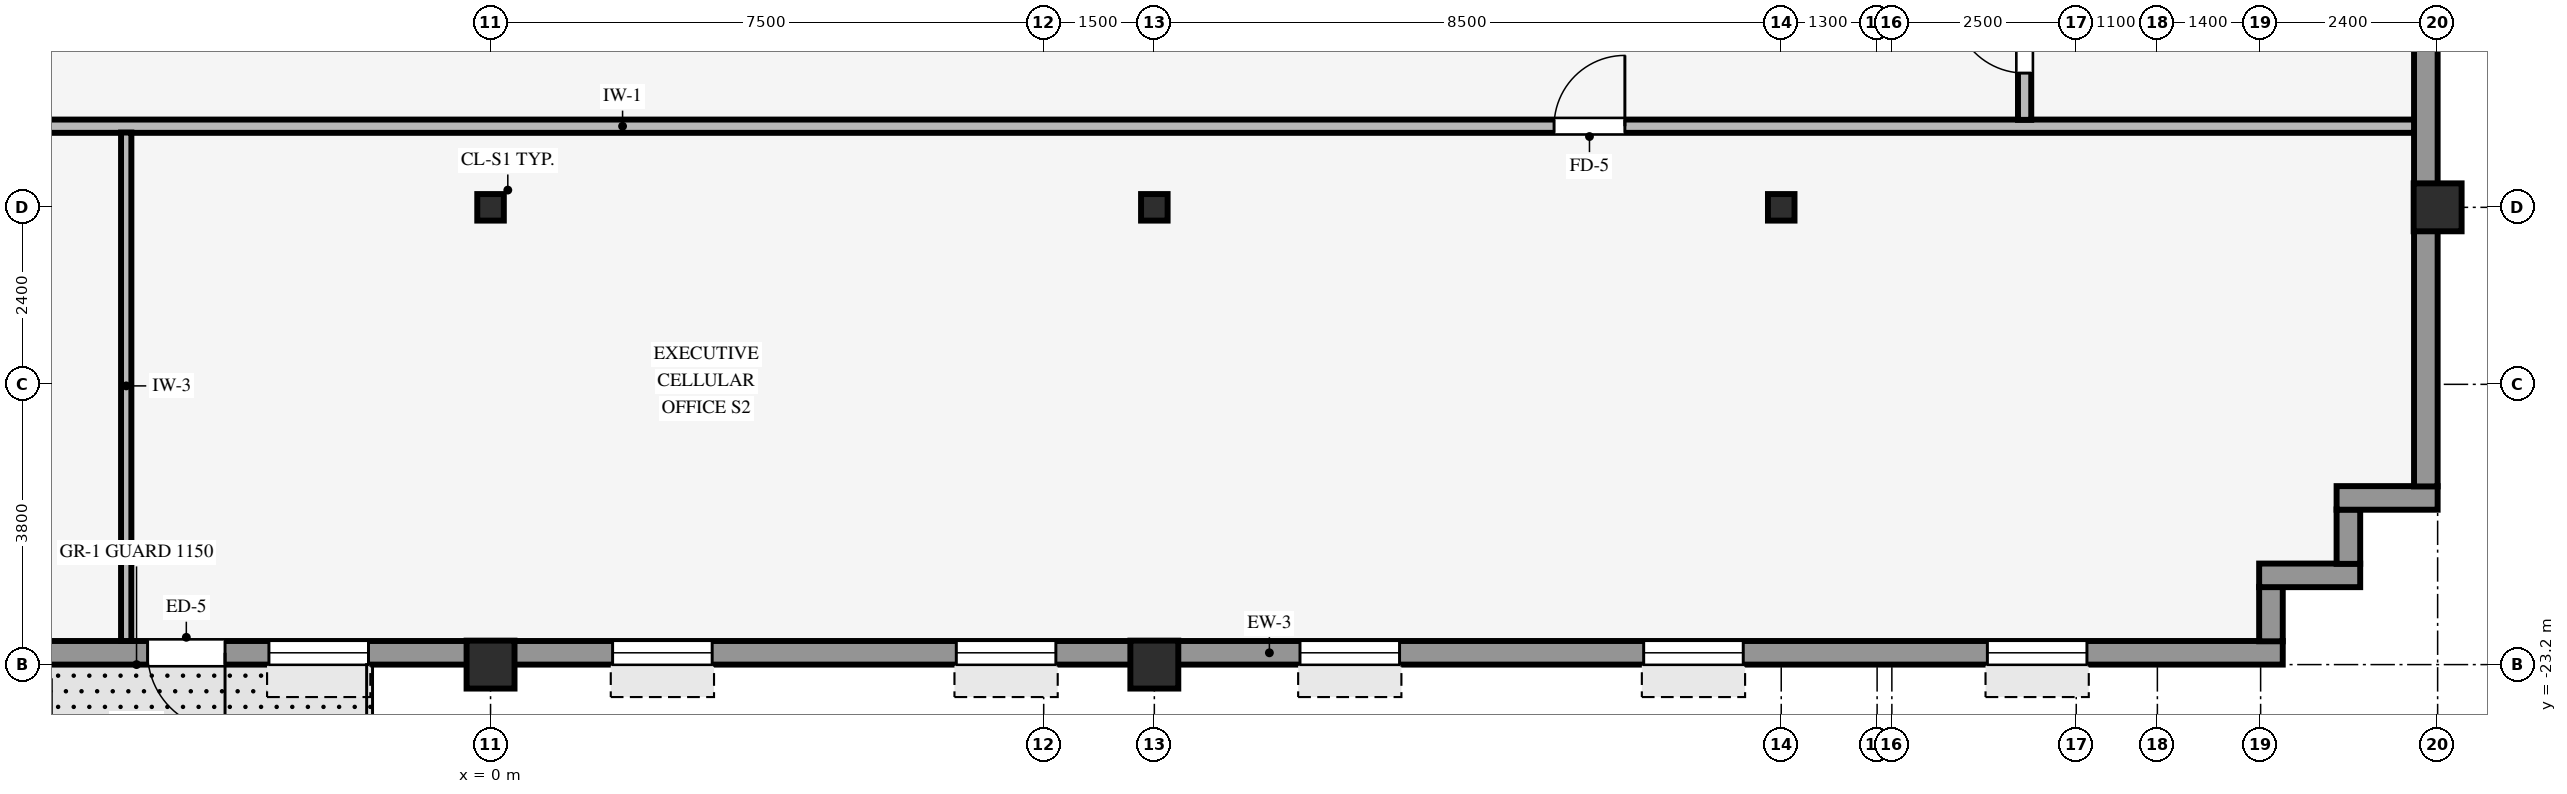
"""IFC4 building model, lengths in metres.
Left out: names, types, materials, properties, quantities, classifications, styles, units other than length and angle.
Written with IfcOpenShell. Run it as: python <this file> out.ifc"""

import sys

from ifc_helpers import new_model, si_unit, direction, frame, frame_2d, origin, origin_2d, place, context, subcontext, project, spatial, rectangle, hollow_rectangle, i_section, extrude, source, transform, mapped, element, fill, save


model = new_model("IFC4")
c1 = context("Model", 3, precision=1e-05, world=origin(), true_north=direction((0.0, 1.0)))
c2 = subcontext(c1, "Body", "Model", "MODEL_VIEW")
j1 = project(units=[si_unit("LENGTHUNIT", "METRE"), si_unit("PLANEANGLEUNIT", "RADIAN")], contexts=[c1])
p1 = place(None, origin())
s1 = spatial("IfcSite", under=j1, at=p1, CompositionType="ELEMENT")
p2 = place(p1, origin())
s2 = spatial("IfcBuilding", under=s1, at=p2, CompositionType="ELEMENT")
p3 = place(p2, frame((0.0, 0.0, 134.8)))
s3 = spatial("IfcBuildingStorey", under=s2, at=p3, CompositionType="ELEMENT", Elevation=134.8)
for number, where, z_axis, x_axis in (
    (1, (26.4, -17.0, 0.0), (0.0, 0.0, 1.0), (1.0, 0.0, 0.0)),
    (2, (0.0, -23.2, 0.0), (0.0, 0.0, 1.0), (1.0, 0.0, 0.0)),
    (3, (9.0, -23.2, 0.0), (0.0, 0.0, 1.0), (1.0, 0.0, 0.0)),
):
    element("IfcColumn", number, at=place(p3, frame(where, z_axis=z_axis, x_axis=x_axis)), inside=s3, PredefinedType="COLUMN", context=c2, shape_type="SweptSolid", body=[
        extrude(hollow_rectangle(XDim=0.65, YDim=0.65, WallThickness=0.04, InnerFilletRadius=0.04, OuterFilletRadius=0.08, at=origin_2d()), origin(), (0.0, 0.0, 1.0), 3.37),
    ])
for number, where, z_axis, x_axis in (
    (4, (0.0, -17.0, 0.0), (0.0, 0.0, 1.0), (1.0, 0.0, 0.0)),
    (5, (9.0, -17.0, 0.0), (0.0, 0.0, 1.0), (1.0, 0.0, 0.0)),
    (6, (17.5, -17.0, 0.0), (0.0, 0.0, 1.0), (1.0, 0.0, 0.0)),
):
    element("IfcColumn", number, at=place(p3, frame(where, z_axis=z_axis, x_axis=x_axis)), inside=s3, PredefinedType="COLUMN", context=c2, shape_type="SweptSolid", body=[
        extrude(i_section(OverallWidth=0.36, OverallDepth=0.36, WebThickness=0.021, FlangeThickness=0.021, FilletRadius=0.018, at=origin_2d()), origin(), (0.0, 0.0, 1.0), 3.37),
    ])
p4 = place(p3, frame((-24.3, -23.04, 0.0), z_axis=(0.0, 0.0, 1.0), x_axis=(1.0, 0.0, 0.0)))
e7 = element("IfcWall", 7, at=p4, inside=s3, PredefinedType="STANDARD", context=c2, shape_type="SweptSolid", body=[
    extrude(rectangle(XDim=48.6, YDim=0.32, at=frame_2d((24.3, 0.0))), origin(), (0.0, 0.0, 1.0), 2.705),
])
p5 = place(p4, frame((20.7, 0.0, 0.0), z_axis=(0.0, 0.0, 1.0), x_axis=(-1.0, 0.0, 0.0)))
e8 = element("IfcOpeningElement", 8, at=p5, cuts=e7, PredefinedType="OPENING", context=c2, shape_type="SweptSolid", body=[
    extrude(rectangle(XDim=1.05, YDim=2.1, at=frame_2d((0.525, 1.05))), frame((0.0, 0.17, 0.0), z_axis=(0.0, -1.0, 0.0), x_axis=(1.0, 0.0, 0.0)), (0.0, 0.0, 1.0), 0.34),
])
p6 = place(p4, frame((2.655, 0.0, 0.8)))
e9 = element("IfcOpeningElement", 9, at=p6, cuts=e7, PredefinedType="OPENING", context=c2, shape_type="SweptSolid", body=[
    extrude(rectangle(XDim=1.35, YDim=1.56, at=frame_2d((0.675, 0.78))), frame((0.0, 0.17, 0.0), z_axis=(0.0, -1.0, 0.0), x_axis=(1.0, 0.0, 0.0)), (0.0, 0.0, 1.0), 0.34),
])
p7 = place(p4, frame((7.315, 0.0, 0.8)))
e10 = element("IfcOpeningElement", 10, at=p7, cuts=e7, PredefinedType="OPENING", context=c2, shape_type="SweptSolid", body=[
    extrude(rectangle(XDim=1.35, YDim=1.56, at=frame_2d((0.675, 0.78))), frame((0.0, 0.17, 0.0), z_axis=(0.0, -1.0, 0.0), x_axis=(1.0, 0.0, 0.0)), (0.0, 0.0, 1.0), 0.34),
])
p8 = place(p4, frame((11.975, 0.0, 0.8)))
e11 = element("IfcOpeningElement", 11, at=p8, cuts=e7, PredefinedType="OPENING", context=c2, shape_type="SweptSolid", body=[
    extrude(rectangle(XDim=1.35, YDim=1.56, at=frame_2d((0.675, 0.78))), frame((0.0, 0.17, 0.0), z_axis=(0.0, -1.0, 0.0), x_axis=(1.0, 0.0, 0.0)), (0.0, 0.0, 1.0), 0.34),
])
p9 = place(p4, frame((16.635, 0.0, 0.8)))
e12 = element("IfcOpeningElement", 12, at=p9, cuts=e7, PredefinedType="OPENING", context=c2, shape_type="SweptSolid", body=[
    extrude(rectangle(XDim=1.35, YDim=1.56, at=frame_2d((0.675, 0.78))), frame((0.0, 0.17, 0.0), z_axis=(0.0, -1.0, 0.0), x_axis=(1.0, 0.0, 0.0)), (0.0, 0.0, 1.0), 0.34),
])
p10 = place(p4, frame((21.295, 0.0, 0.8)))
e13 = element("IfcOpeningElement", 13, at=p10, cuts=e7, PredefinedType="OPENING", context=c2, shape_type="SweptSolid", body=[
    extrude(rectangle(XDim=1.35, YDim=1.56, at=frame_2d((0.675, 0.78))), frame((0.0, 0.17, 0.0), z_axis=(0.0, -1.0, 0.0), x_axis=(1.0, 0.0, 0.0)), (0.0, 0.0, 1.0), 0.34),
])
p11 = place(p4, frame((25.955, 0.0, 0.8)))
e14 = element("IfcOpeningElement", 14, at=p11, cuts=e7, PredefinedType="OPENING", context=c2, shape_type="SweptSolid", body=[
    extrude(rectangle(XDim=1.35, YDim=1.56, at=frame_2d((0.675, 0.78))), frame((0.0, 0.17, 0.0), z_axis=(0.0, -1.0, 0.0), x_axis=(1.0, 0.0, 0.0)), (0.0, 0.0, 1.0), 0.34),
])
p12 = place(p4, frame((30.615, 0.0, 0.8)))
e15 = element("IfcOpeningElement", 15, at=p12, cuts=e7, PredefinedType="OPENING", context=c2, shape_type="SweptSolid", body=[
    extrude(rectangle(XDim=1.35, YDim=1.56, at=frame_2d((0.675, 0.78))), frame((0.0, 0.17, 0.0), z_axis=(0.0, -1.0, 0.0), x_axis=(1.0, 0.0, 0.0)), (0.0, 0.0, 1.0), 0.34),
])
p13 = place(p4, frame((35.275, 0.0, 0.8)))
e16 = element("IfcOpeningElement", 16, at=p13, cuts=e7, PredefinedType="OPENING", context=c2, shape_type="SweptSolid", body=[
    extrude(rectangle(XDim=1.35, YDim=1.56, at=frame_2d((0.675, 0.78))), frame((0.0, 0.17, 0.0), z_axis=(0.0, -1.0, 0.0), x_axis=(1.0, 0.0, 0.0)), (0.0, 0.0, 1.0), 0.34),
])
p14 = place(p4, frame((39.935, 0.0, 0.8)))
e17 = element("IfcOpeningElement", 17, at=p14, cuts=e7, PredefinedType="OPENING", context=c2, shape_type="SweptSolid", body=[
    extrude(rectangle(XDim=1.35, YDim=1.56, at=frame_2d((0.675, 0.78))), frame((0.0, 0.17, 0.0), z_axis=(0.0, -1.0, 0.0), x_axis=(1.0, 0.0, 0.0)), (0.0, 0.0, 1.0), 0.34),
])
p15 = place(p4, frame((44.595, 0.0, 0.8)))
e18 = element("IfcOpeningElement", 18, at=p15, cuts=e7, PredefinedType="OPENING", context=c2, shape_type="SweptSolid", body=[
    extrude(rectangle(XDim=1.35, YDim=1.56, at=frame_2d((0.675, 0.78))), frame((0.0, 0.17, 0.0), z_axis=(0.0, -1.0, 0.0), x_axis=(1.0, 0.0, 0.0)), (0.0, 0.0, 1.0), 0.34),
])
p16 = place(p3, frame((24.14, -22.884, 0.0), z_axis=(0.0, 0.0, 1.0), x_axis=(0.0, 1.0, 0.0)))
e19 = element("IfcWall", 19, at=p16, inside=s3, PredefinedType="STANDARD", context=c2, shape_type="SweptSolid", body=[
    extrude(rectangle(XDim=0.738, YDim=0.32, at=frame_2d((0.369, 0.0))), origin(), (0.0, 0.0, 1.0), 3.36),
])
p17 = place(p3, frame((23.98, -21.99, 0.0), z_axis=(0.0, 0.0, 1.0), x_axis=(1.0, 0.0, 0.0)))
e20 = element("IfcWall", 20, at=p17, inside=s3, PredefinedType="STANDARD", context=c2, shape_type="SweptSolid", body=[
    extrude(rectangle(XDim=1.37, YDim=0.32, at=frame_2d((0.685, 0.0))), origin(), (0.0, 0.0, 1.0), 3.36),
])
p18 = place(p3, frame((25.19, -21.834, 0.0), z_axis=(0.0, 0.0, 1.0), x_axis=(0.0, 1.0, 0.0)))
e21 = element("IfcWall", 21, at=p18, inside=s3, PredefinedType="STANDARD", context=c2, shape_type="SweptSolid", body=[
    extrude(rectangle(XDim=0.738, YDim=0.32, at=frame_2d((0.369, 0.0))), origin(), (0.0, 0.0, 1.0), 3.36),
])
p19 = place(p3, frame((25.03, -20.94, 0.0), z_axis=(0.0, 0.0, 1.0), x_axis=(1.0, 0.0, 0.0)))
e22 = element("IfcWall", 22, at=p19, inside=s3, PredefinedType="STANDARD", context=c2, shape_type="SweptSolid", body=[
    extrude(rectangle(XDim=1.37, YDim=0.32, at=frame_2d((0.685, 0.0))), origin(), (0.0, 0.0, 1.0), 3.36),
])
p20 = place(p3, frame((26.24, -20.784, 0.0), z_axis=(0.0, 0.0, 1.0), x_axis=(0.0, 1.0, 0.0)))
e23 = element("IfcWall", 23, at=p20, inside=s3, PredefinedType="STANDARD", context=c2, shape_type="SweptSolid", body=[
    extrude(rectangle(XDim=41.568, YDim=0.32, at=frame_2d((20.784, 0.0))), origin(), (0.0, 0.0, 1.0), 2.705),
])
p21 = place(p20, frame((7.369, 0.0, 0.8)))
e24 = element("IfcOpeningElement", 24, at=p21, cuts=e23, PredefinedType="OPENING", context=c2, shape_type="SweptSolid", body=[
    extrude(rectangle(XDim=2.1, YDim=1.56, at=frame_2d((1.05, 0.78))), frame((0.0, 0.17, 0.0), z_axis=(0.0, -1.0, 0.0), x_axis=(1.0, 0.0, 0.0)), (0.0, 0.0, 1.0), 0.34),
])
p22 = place(p20, frame((12.315, 0.0, 0.8)))
e25 = element("IfcOpeningElement", 25, at=p22, cuts=e23, PredefinedType="OPENING", context=c2, shape_type="SweptSolid", body=[
    extrude(rectangle(XDim=2.1, YDim=1.56, at=frame_2d((1.05, 0.78))), frame((0.0, 0.17, 0.0), z_axis=(0.0, -1.0, 0.0), x_axis=(1.0, 0.0, 0.0)), (0.0, 0.0, 1.0), 0.34),
])
p23 = place(p20, frame((17.711, 0.0, 0.8)))
e26 = element("IfcOpeningElement", 26, at=p23, cuts=e23, PredefinedType="OPENING", context=c2, shape_type="SweptSolid", body=[
    extrude(rectangle(XDim=2.1, YDim=1.56, at=frame_2d((1.05, 0.78))), frame((0.0, 0.17, 0.0), z_axis=(0.0, -1.0, 0.0), x_axis=(1.0, 0.0, 0.0)), (0.0, 0.0, 1.0), 0.34),
])
p24 = place(p20, frame((22.207, 0.0, 0.8)))
e27 = element("IfcOpeningElement", 27, at=p24, cuts=e23, PredefinedType="OPENING", context=c2, shape_type="SweptSolid", body=[
    extrude(rectangle(XDim=2.1, YDim=1.56, at=frame_2d((1.05, 0.78))), frame((0.0, 0.17, 0.0), z_axis=(0.0, -1.0, 0.0), x_axis=(1.0, 0.0, 0.0)), (0.0, 0.0, 1.0), 0.34),
])
p25 = place(p20, frame((27.153, 0.0, 0.8)))
e28 = element("IfcOpeningElement", 28, at=p25, cuts=e23, PredefinedType="OPENING", context=c2, shape_type="SweptSolid", body=[
    extrude(rectangle(XDim=2.1, YDim=1.56, at=frame_2d((1.05, 0.78))), frame((0.0, 0.17, 0.0), z_axis=(0.0, -1.0, 0.0), x_axis=(1.0, 0.0, 0.0)), (0.0, 0.0, 1.0), 0.34),
])
p26 = place(p20, frame((32.099, 0.0, 0.8)))
e29 = element("IfcOpeningElement", 29, at=p26, cuts=e23, PredefinedType="OPENING", context=c2, shape_type="SweptSolid", body=[
    extrude(rectangle(XDim=2.1, YDim=1.56, at=frame_2d((1.05, 0.78))), frame((0.0, 0.17, 0.0), z_axis=(0.0, -1.0, 0.0), x_axis=(1.0, 0.0, 0.0)), (0.0, 0.0, 1.0), 0.34),
])
p27 = place(p3, frame((-26.08, -15.9, 0.0), z_axis=(0.0, 0.0, 1.0), x_axis=(1.0, 0.0, 0.0)))
e30 = element("IfcWall", 30, at=p27, inside=s3, PredefinedType="PARTITIONING", context=c2, shape_type="SweptSolid", body=[
    extrude(rectangle(XDim=52.16, YDim=0.18, at=frame_2d((26.08, 0.0))), origin(), (0.0, 0.0, 1.0), 3.36),
])
p28 = place(p27, frame((14.28, 0.0, 0.0)))
e31 = element("IfcOpeningElement", 31, at=p28, cuts=e30, PredefinedType="OPENING", context=c2, shape_type="SweptSolid", body=[
    extrude(rectangle(XDim=0.96, YDim=2.1, at=frame_2d((0.48, 1.05))), frame((0.0, 0.1, 0.0), z_axis=(0.0, -1.0, 0.0), x_axis=(1.0, 0.0, 0.0)), (0.0, 0.0, 1.0), 0.2),
])
p29 = place(p27, frame((40.5, 0.0, 0.0)))
e32 = element("IfcOpeningElement", 32, at=p29, cuts=e30, PredefinedType="OPENING", context=c2, shape_type="SweptSolid", body=[
    extrude(rectangle(XDim=0.96, YDim=2.1, at=frame_2d((0.48, 1.05))), frame((0.0, 0.1, 0.0), z_axis=(0.0, -1.0, 0.0), x_axis=(1.0, 0.0, 0.0)), (0.0, 0.0, 1.0), 0.2),
])
p30 = place(p3, frame((-4.94, -22.88, 0.0), z_axis=(0.0, 0.0, 1.0), x_axis=(0.0, 1.0, 0.0)))
e33 = element("IfcWall", 33, at=p30, inside=s3, PredefinedType="PARTITIONING", context=c2, shape_type="SweptSolid", body=[
    extrude(rectangle(XDim=6.894, YDim=0.14, at=frame_2d((3.447, 0.0))), origin(), (0.0, 0.0, 1.0), 3.36),
])
p31 = place(p3, frame((20.8, -15.814, 0.0), z_axis=(0.0, 0.0, 1.0), x_axis=(0.0, 1.0, 0.0)))
e34 = element("IfcWall", 34, at=p31, inside=s3, PredefinedType="PARTITIONING", context=c2, shape_type="SweptSolid", body=[
    extrude(rectangle(XDim=2.228, YDim=0.18, at=frame_2d((1.114, 0.0))), origin(), (0.0, 0.0, 1.0), 3.36),
])
p32 = place(p31, frame((0.634, 0.0, 0.0)))
e35 = element("IfcOpeningElement", 35, at=p32, cuts=e34, PredefinedType="OPENING", context=c2, shape_type="SweptSolid", body=[
    extrude(rectangle(XDim=0.96, YDim=2.1, at=frame_2d((0.48, 1.05))), frame((0.0, 0.1, 0.0), z_axis=(0.0, -1.0, 0.0), x_axis=(1.0, 0.0, 0.0)), (0.0, 0.0, 1.0), 0.2),
])
m1 = source(origin(), c2, "Body", "SweptSolid", [
    extrude(rectangle(XDim=1.05, YDim=2.1, at=frame_2d((0.525, 1.05))), frame((0.0, 0.025, 0.0), z_axis=(0.0, -1.0, 0.0), x_axis=(1.0, 0.0, 0.0)), (0.0, 0.0, 1.0), 0.05),
])
p33 = place(p5, origin())
e36 = element("IfcDoor", 36, at=p33, inside=s3, OperationType="SINGLE_SWING_LEFT", PredefinedType="DOOR", context=c2, shape_type="MappedRepresentation", body=[
    mapped(m1, transform((0.0, 0.0, 0.0), scale=1.0)),
])
fill(e8, e36)
m2 = source(origin(), c2, "Body", "SweptSolid", [
    extrude(rectangle(XDim=1.35, YDim=1.56, at=frame_2d((0.675, 0.78))), frame((0.0, 0.03, 0.0), z_axis=(0.0, -1.0, 0.0), x_axis=(1.0, 0.0, 0.0)), (0.0, 0.0, 1.0), 0.06),
])
p34 = place(p10, origin())
e37 = element("IfcWindow", 37, at=p34, inside=s3, PartitioningType="SINGLE_PANEL", PredefinedType="WINDOW", context=c2, shape_type="MappedRepresentation", body=[
    mapped(m2, transform((0.0, 0.0, 0.0), scale=1.0)),
])
fill(e13, e37)
p35 = place(p11, origin())
e38 = element("IfcWindow", 38, at=p35, inside=s3, PartitioningType="SINGLE_PANEL", PredefinedType="WINDOW", context=c2, shape_type="MappedRepresentation", body=[
    mapped(m2, transform((0.0, 0.0, 0.0), scale=1.0)),
])
fill(e14, e38)
p36 = place(p12, origin())
e39 = element("IfcWindow", 39, at=p36, inside=s3, PartitioningType="SINGLE_PANEL", PredefinedType="WINDOW", context=c2, shape_type="MappedRepresentation", body=[
    mapped(m2, transform((0.0, 0.0, 0.0), scale=1.0)),
])
fill(e15, e39)
p37 = place(p13, origin())
e40 = element("IfcWindow", 40, at=p37, inside=s3, PartitioningType="SINGLE_PANEL", PredefinedType="WINDOW", context=c2, shape_type="MappedRepresentation", body=[
    mapped(m2, transform((0.0, 0.0, 0.0), scale=1.0)),
])
fill(e16, e40)
p38 = place(p14, origin())
e41 = element("IfcWindow", 41, at=p38, inside=s3, PartitioningType="SINGLE_PANEL", PredefinedType="WINDOW", context=c2, shape_type="MappedRepresentation", body=[
    mapped(m2, transform((0.0, 0.0, 0.0), scale=1.0)),
])
fill(e17, e41)
p39 = place(p15, origin())
e42 = element("IfcWindow", 42, at=p39, inside=s3, PartitioningType="SINGLE_PANEL", PredefinedType="WINDOW", context=c2, shape_type="MappedRepresentation", body=[
    mapped(m2, transform((0.0, 0.0, 0.0), scale=1.0)),
])
fill(e18, e42)
m3 = source(origin(), c2, "Body", "SweptSolid", [
    extrude(rectangle(XDim=0.96, YDim=2.1, at=frame_2d((0.48, 1.05))), frame((0.0, 0.025, 0.0), z_axis=(0.0, -1.0, 0.0), x_axis=(1.0, 0.0, 0.0)), (0.0, 0.0, 1.0), 0.05),
])
p40 = place(p29, origin())
e43 = element("IfcDoor", 43, at=p40, inside=s3, OperationType="SINGLE_SWING_RIGHT", PredefinedType="DOOR", context=c2, shape_type="MappedRepresentation", body=[
    mapped(m3, transform((0.0, 0.0, 0.0), scale=1.0)),
])
fill(e32, e43)
p41 = place(p32, origin())
e44 = element("IfcDoor", 44, at=p41, inside=s3, OperationType="SINGLE_SWING_RIGHT", PredefinedType="DOOR", context=c2, shape_type="MappedRepresentation", body=[
    mapped(m3, transform((0.0, 0.0, 0.0), scale=1.0)),
])
fill(e35, e44)
save(model, sys.argv[1])
